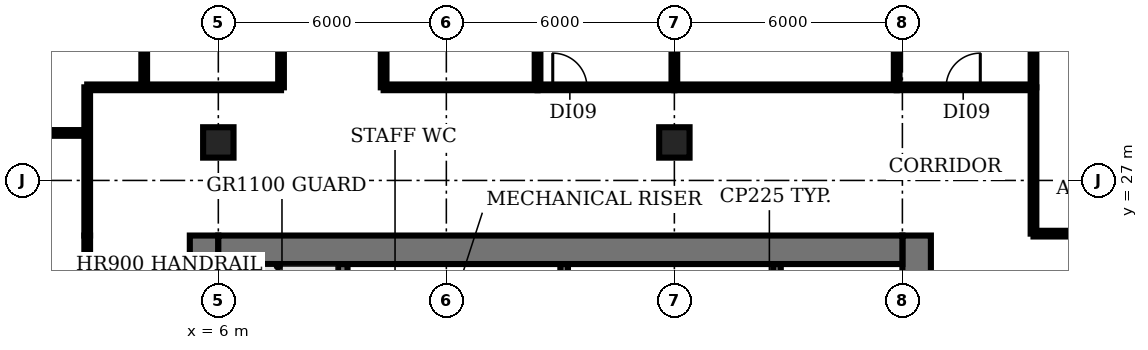
"""IFC4 building model, lengths in metres.
Left out: names, types, materials, properties, quantities, classifications, styles, units other than length and angle.
Written with IfcOpenShell. Run it as: python <this file> out.ifc"""

import sys

from ifc_helpers import new_model, si_unit, direction, frame, frame_2d, origin, origin_2d, place, context, subcontext, project, spatial, rectangle, extrude, element, fill, save


model = new_model("IFC4")
c1 = context("Model", 3, precision=1e-05, world=origin(), true_north=direction((0.0, 1.0)))
c2 = subcontext(c1, "Body", "Model", "MODEL_VIEW")
j1 = project(units=[si_unit("LENGTHUNIT", "METRE"), si_unit("PLANEANGLEUNIT", "RADIAN")], contexts=[c1])
p1 = place(None, origin())
s1 = spatial("IfcSite", under=j1, at=p1, CompositionType="ELEMENT")
p2 = place(p1, origin())
s2 = spatial("IfcBuilding", under=s1, at=p2, CompositionType="ELEMENT")
p3 = place(p2, frame((0.0, 0.0, 104.6)))
s3 = spatial("IfcBuildingStorey", under=s2, at=p3, CompositionType="ELEMENT", Elevation=104.6)
for number, where, z_axis, x_axis in (
    (1, (6.0, 28.0, 0.0), (0.0, 0.0, 1.0), (1.0, 0.0, 0.0)),
    (2, (18.0, 28.0, 0.0), (0.0, 0.0, 1.0), (1.0, 0.0, 0.0)),
):
    element("IfcColumn", number, at=place(p3, frame(where, z_axis=z_axis, x_axis=x_axis)), inside=s3, PredefinedType="COLUMN", context=c2, shape_type="SweptSolid", body=[
        extrude(rectangle(XDim=0.8, YDim=0.8, at=origin_2d()), origin(), (0.0, 0.0, 1.0), 3.85),
    ])
p4 = place(p3, frame((9.275, 18.375, 0.0), z_axis=(0.0, 0.0, 1.0), x_axis=(0.0, 1.0, 0.0)))
e3 = element("IfcWall", 3, at=p4, inside=s3, PredefinedType="SHEAR", context=c2, shape_type="SweptSolid", body=[
    extrude(rectangle(XDim=6.425, YDim=0.25, at=frame_2d((3.212, 0.0))), origin(), (0.0, 0.0, 1.0), 3.85),
])
for number, where, z_axis, x_axis in (
    (4, (15.1, 22.9, 0.0), (0.0, 0.0, 1.0), (0.0, 1.0, 0.0)),
    (5, (20.7, 22.9, 0.0), (0.0, 0.0, 1.0), (0.0, 1.0, 0.0)),
):
    element("IfcWall", number, at=place(p3, frame(where, z_axis=z_axis, x_axis=x_axis)), inside=s3, PredefinedType="SHEAR", context=c2, shape_type="SweptSolid", body=[
        extrude(rectangle(XDim=1.9, YDim=0.2, at=frame_2d((0.95, 0.0))), origin(), (0.0, 0.0, 1.0), 3.85),
    ])
p5 = place(p3, frame((5.625, 4.47, 0.0), z_axis=(0.0, 0.0, 1.0), x_axis=(0.0, 1.0, 0.0)))
e6 = element("IfcWall", 6, at=p5, inside=s3, PredefinedType="SHEAR", context=c2, shape_type="SweptSolid", body=[
    extrude(rectangle(XDim=21.08, YDim=0.75, at=frame_2d((10.54, 0.0))), origin(), (0.0, 0.0, 1.0), 3.85),
])
p6 = place(p5, frame((1.18, 0.0, 0.0)))
e7 = element("IfcOpeningElement", 7, at=p6, cuts=e6, PredefinedType="OPENING", context=c2, shape_type="SweptSolid", body=[
    extrude(rectangle(XDim=1.5, YDim=2.1, at=frame_2d((0.75, 1.05))), frame((0.0, 0.385, 0.0), z_axis=(0.0, -1.0, 0.0), x_axis=(1.0, 0.0, 0.0)), (0.0, 0.0, 1.0), 0.77),
])
p7 = place(p5, frame((7.63, 0.0, 0.0)))
e8 = element("IfcOpeningElement", 8, at=p7, cuts=e6, PredefinedType="OPENING", context=c2, shape_type="SweptSolid", body=[
    extrude(rectangle(XDim=1.2, YDim=2.1, at=frame_2d((0.6, 1.05))), frame((0.0, 0.385, 0.0), z_axis=(0.0, -1.0, 0.0), x_axis=(1.0, 0.0, 0.0)), (0.0, 0.0, 1.0), 0.77),
])
p8 = place(p5, frame((14.18, 0.0, 0.0)))
e9 = element("IfcOpeningElement", 9, at=p8, cuts=e6, PredefinedType="OPENING", context=c2, shape_type="SweptSolid", body=[
    extrude(rectangle(XDim=1.2, YDim=2.1, at=frame_2d((0.6, 1.05))), frame((0.0, 0.385, 0.0), z_axis=(0.0, -1.0, 0.0), x_axis=(1.0, 0.0, 0.0)), (0.0, 0.0, 1.0), 0.77),
])
p9 = place(p3, frame((24.375, 25.55, 0.0), z_axis=(0.0, 0.0, 1.0), x_axis=(0.0, -1.0, 0.0)))
e10 = element("IfcWall", 10, at=p9, inside=s3, PredefinedType="SHEAR", context=c2, shape_type="SweptSolid", body=[
    extrude(rectangle(XDim=21.13, YDim=0.75, at=frame_2d((10.565, 0.0))), origin(), (0.0, 0.0, 1.0), 3.85),
])
p10 = place(p9, frame((18.4, 0.0, 0.0)))
e11 = element("IfcOpeningElement", 11, at=p10, cuts=e10, PredefinedType="OPENING", context=c2, shape_type="SweptSolid", body=[
    extrude(rectangle(XDim=1.5, YDim=2.1, at=frame_2d((0.75, 1.05))), frame((0.0, 0.385, 0.0), z_axis=(0.0, -1.0, 0.0), x_axis=(1.0, 0.0, 0.0)), (0.0, 0.0, 1.0), 0.77),
])
p11 = place(p9, frame((12.3, 0.0, 0.0)))
e12 = element("IfcOpeningElement", 12, at=p11, cuts=e10, PredefinedType="OPENING", context=c2, shape_type="SweptSolid", body=[
    extrude(rectangle(XDim=0.9, YDim=2.1, at=frame_2d((0.45, 1.05))), frame((0.0, 0.385, 0.0), z_axis=(0.0, -1.0, 0.0), x_axis=(1.0, 0.0, 0.0)), (0.0, 0.0, 1.0), 0.77),
])
p12 = place(p9, frame((6.3, 0.0, 0.0)))
e13 = element("IfcOpeningElement", 13, at=p12, cuts=e10, PredefinedType="OPENING", context=c2, shape_type="SweptSolid", body=[
    extrude(rectangle(XDim=2.0, YDim=2.1, at=frame_2d((1.0, 1.05))), frame((0.0, 0.385, 0.0), z_axis=(0.0, -1.0, 0.0), x_axis=(1.0, 0.0, 0.0)), (0.0, 0.0, 1.0), 0.77),
])
p13 = place(p3, frame((6.0, 25.175, 0.0), z_axis=(0.0, 0.0, 1.0), x_axis=(1.0, 0.0, 0.0)))
e14 = element("IfcWall", 14, at=p13, inside=s3, PredefinedType="SHEAR", context=c2, shape_type="SweptSolid", body=[
    extrude(rectangle(XDim=18.0, YDim=0.75, at=frame_2d((9.0, 0.0))), origin(), (0.0, 0.0, 1.0), 3.85),
])
p14 = place(p3, frame((-0.98, 28.25, 0.0), z_axis=(0.0, 0.0, 1.0), x_axis=(1.0, 0.0, 0.0)))
e15 = element("IfcWall", 15, at=p14, inside=s3, PredefinedType="PARTITIONING", context=c2, shape_type="SweptSolid", body=[
    extrude(rectangle(XDim=3.53, YDim=0.15, at=frame_2d((1.765, 0.0))), origin(), (0.0, 0.0, 1.0), 2.83),
])
p15 = place(p3, frame((2.55, 6.113, 0.0), z_axis=(0.0, 0.0, 1.0), x_axis=(0.0, 1.0, 0.0)))
e16 = element("IfcWall", 16, at=p15, inside=s3, PredefinedType="PARTITIONING", context=c2, shape_type="SweptSolid", body=[
    extrude(rectangle(XDim=19.437, YDim=0.15, at=frame_2d((9.718, 0.0))), origin(), (0.0, 0.0, 1.0), 2.83),
])
p16 = place(p15, frame((7.537, 0.0, 0.0)))
e17 = element("IfcOpeningElement", 17, at=p16, cuts=e16, PredefinedType="OPENING", context=c2, shape_type="SweptSolid", body=[
    extrude(rectangle(XDim=1.2, YDim=2.1, at=frame_2d((0.6, 1.05))), frame((0.0, 0.085, 0.0), z_axis=(0.0, -1.0, 0.0), x_axis=(1.0, 0.0, 0.0)), (0.0, 0.0, 1.0), 0.17),
])
p17 = place(p3, frame((2.55, 25.55, 0.0), z_axis=(0.0, 0.0, 1.0), x_axis=(0.0, 1.0, 0.0)))
e18 = element("IfcWall", 18, at=p17, inside=s3, PredefinedType="PARTITIONING", context=c2, shape_type="SweptSolid", body=[
    extrude(rectangle(XDim=3.9, YDim=0.15, at=frame_2d((1.95, 0.0))), origin(), (0.0, 0.0, 1.0), 2.83),
])
p18 = place(p3, frame((2.55, 29.45, 0.0), z_axis=(0.0, 0.0, 1.0), x_axis=(1.0, 0.0, 0.0)))
e19 = element("IfcWall", 19, at=p18, inside=s3, PredefinedType="PARTITIONING", context=c2, shape_type="SweptSolid", body=[
    extrude(rectangle(XDim=5.1, YDim=0.15, at=frame_2d((2.55, 0.0))), origin(), (0.0, 0.0, 1.0), 2.83),
])
p19 = place(p3, frame((4.05, 29.45, 0.0), z_axis=(0.0, 0.0, 1.0), x_axis=(0.0, 1.0, 0.0)))
e20 = element("IfcWall", 20, at=p19, inside=s3, PredefinedType="PARTITIONING", context=c2, shape_type="SweptSolid", body=[
    extrude(rectangle(XDim=4.8, YDim=0.15, at=frame_2d((2.4, 0.0))), origin(), (0.0, 0.0, 1.0), 2.83),
])
p20 = place(p3, frame((7.65, 29.45, 0.0), z_axis=(0.0, 0.0, 1.0), x_axis=(0.0, 1.0, 0.0)))
e21 = element("IfcWall", 21, at=p20, inside=s3, PredefinedType="PARTITIONING", context=c2, shape_type="SweptSolid", body=[
    extrude(rectangle(XDim=4.8, YDim=0.15, at=frame_2d((2.4, 0.0))), origin(), (0.0, 0.0, 1.0), 2.83),
])
p21 = place(p20, frame((1.9, 0.0, 0.0)))
e22 = element("IfcOpeningElement", 22, at=p21, cuts=e21, PredefinedType="OPENING", context=c2, shape_type="SweptSolid", body=[
    extrude(rectangle(XDim=0.9, YDim=2.1, at=frame_2d((0.45, 1.05))), frame((0.0, 0.085, 0.0), z_axis=(0.0, -1.0, 0.0), x_axis=(1.0, 0.0, 0.0)), (0.0, 0.0, 1.0), 0.17),
])
p22 = place(p3, frame((10.35, 29.45, 0.0), z_axis=(0.0, 0.0, 1.0), x_axis=(0.0, 1.0, 0.0)))
e23 = element("IfcWall", 23, at=p22, inside=s3, PredefinedType="PARTITIONING", context=c2, shape_type="SweptSolid", body=[
    extrude(rectangle(XDim=4.8, YDim=0.15, at=frame_2d((2.4, 0.0))), origin(), (0.0, 0.0, 1.0), 2.83),
])
p23 = place(p3, frame((10.35, 29.45, 0.0), z_axis=(0.0, 0.0, 1.0), x_axis=(1.0, 0.0, 0.0)))
e24 = element("IfcWall", 24, at=p23, inside=s3, PredefinedType="PARTITIONING", context=c2, shape_type="SweptSolid", body=[
    extrude(rectangle(XDim=4.05, YDim=0.15, at=frame_2d((2.025, 0.0))), origin(), (0.0, 0.0, 1.0), 2.83),
])
p24 = place(p3, frame((14.4, 29.45, 0.0), z_axis=(0.0, 0.0, 1.0), x_axis=(0.0, 1.0, 0.0)))
e25 = element("IfcWall", 25, at=p24, inside=s3, PredefinedType="PARTITIONING", context=c2, shape_type="SweptSolid", body=[
    extrude(rectangle(XDim=4.8, YDim=0.15, at=frame_2d((2.4, 0.0))), origin(), (0.0, 0.0, 1.0), 2.83),
])
p25 = place(p3, frame((14.4, 29.45, 0.0), z_axis=(0.0, 0.0, 1.0), x_axis=(1.0, 0.0, 0.0)))
e26 = element("IfcWall", 26, at=p25, inside=s3, PredefinedType="PARTITIONING", context=c2, shape_type="SweptSolid", body=[
    extrude(rectangle(XDim=3.6, YDim=0.15, at=frame_2d((1.8, 0.0))), origin(), (0.0, 0.0, 1.0), 2.83),
])
p26 = place(p25, frame((0.4, 0.0, 0.0)))
e27 = element("IfcOpeningElement", 27, at=p26, cuts=e26, PredefinedType="OPENING", context=c2, shape_type="SweptSolid", body=[
    extrude(rectangle(XDim=0.9, YDim=2.1, at=frame_2d((0.45, 1.05))), frame((0.0, 0.085, 0.0), z_axis=(0.0, -1.0, 0.0), x_axis=(1.0, 0.0, 0.0)), (0.0, 0.0, 1.0), 0.17),
])
p27 = place(p3, frame((18.0, 29.45, 0.0), z_axis=(0.0, 0.0, 1.0), x_axis=(0.0, 1.0, 0.0)))
e28 = element("IfcWall", 28, at=p27, inside=s3, PredefinedType="PARTITIONING", context=c2, shape_type="SweptSolid", body=[
    extrude(rectangle(XDim=4.8, YDim=0.15, at=frame_2d((2.4, 0.0))), origin(), (0.0, 0.0, 1.0), 2.83),
])
p28 = place(p3, frame((18.0, 29.45, 0.0), z_axis=(0.0, 0.0, 1.0), x_axis=(1.0, 0.0, 0.0)))
e29 = element("IfcWall", 29, at=p28, inside=s3, PredefinedType="PARTITIONING", context=c2, shape_type="SweptSolid", body=[
    extrude(rectangle(XDim=5.85, YDim=0.15, at=frame_2d((2.925, 0.0))), origin(), (0.0, 0.0, 1.0), 2.83),
])
p29 = place(p3, frame((23.85, 29.45, 0.0), z_axis=(0.0, 0.0, 1.0), x_axis=(0.0, 1.0, 0.0)))
e30 = element("IfcWall", 30, at=p29, inside=s3, PredefinedType="PARTITIONING", context=c2, shape_type="SweptSolid", body=[
    extrude(rectangle(XDim=4.8, YDim=0.15, at=frame_2d((2.4, 0.0))), origin(), (0.0, 0.0, 1.0), 2.83),
])
p30 = place(p3, frame((23.85, 29.45, 0.0), z_axis=(0.0, 0.0, 1.0), x_axis=(1.0, 0.0, 0.0)))
e31 = element("IfcWall", 31, at=p30, inside=s3, PredefinedType="PARTITIONING", context=c2, shape_type="SweptSolid", body=[
    extrude(rectangle(XDim=3.6, YDim=0.15, at=frame_2d((1.8, 0.0))), origin(), (0.0, 0.0, 1.0), 2.83),
])
p31 = place(p30, frame((1.3, 0.0, 0.0)))
e32 = element("IfcOpeningElement", 32, at=p31, cuts=e31, PredefinedType="OPENING", context=c2, shape_type="SweptSolid", body=[
    extrude(rectangle(XDim=0.9, YDim=2.1, at=frame_2d((0.45, 1.05))), frame((0.0, 0.085, 0.0), z_axis=(0.0, -1.0, 0.0), x_axis=(1.0, 0.0, 0.0)), (0.0, 0.0, 1.0), 0.17),
])
p32 = place(p3, frame((27.45, 25.6, 0.0), z_axis=(0.0, 0.0, 1.0), x_axis=(0.0, 1.0, 0.0)))
e33 = element("IfcWall", 33, at=p32, inside=s3, PredefinedType="PARTITIONING", context=c2, shape_type="SweptSolid", body=[
    extrude(rectangle(XDim=3.85, YDim=0.15, at=frame_2d((1.925, 0.0))), origin(), (0.0, 0.0, 1.0), 2.83),
])
p33 = place(p3, frame((27.45, 25.6, 0.0), z_axis=(0.0, 0.0, 1.0), x_axis=(1.0, 0.0, 0.0)))
e34 = element("IfcWall", 34, at=p33, inside=s3, PredefinedType="PARTITIONING", context=c2, shape_type="SweptSolid", body=[
    extrude(rectangle(XDim=8.55, YDim=0.15, at=frame_2d((4.275, 0.0))), origin(), (0.0, 0.0, 1.0), 2.83),
])
p34 = place(p33, frame((4.15, 0.0, 0.0)))
e35 = element("IfcOpeningElement", 35, at=p34, cuts=e34, PredefinedType="OPENING", context=c2, shape_type="SweptSolid", body=[
    extrude(rectangle(XDim=0.9, YDim=2.1, at=frame_2d((0.45, 1.05))), frame((0.0, 0.085, 0.0), z_axis=(0.0, -1.0, 0.0), x_axis=(1.0, 0.0, 0.0)), (0.0, 0.0, 1.0), 0.17),
])
p35 = place(p3, frame((27.45, 29.45, 0.0), z_axis=(0.0, 0.0, 1.0), x_axis=(0.0, 1.0, 0.0)))
e36 = element("IfcWall", 36, at=p35, inside=s3, PredefinedType="PARTITIONING", context=c2, shape_type="SweptSolid", body=[
    extrude(rectangle(XDim=2.64, YDim=0.15, at=frame_2d((1.32, 0.0))), origin(), (0.0, 0.0, 1.0), 2.83),
])
p36 = place(p26, origin())
e37 = element("IfcDoor", 37, at=p36, inside=s3, OperationType="SINGLE_SWING_LEFT", PredefinedType="DOOR", context=c2, shape_type="SweptSolid", body=[
    extrude(rectangle(XDim=0.9, YDim=2.1, at=frame_2d((0.45, 1.05))), frame((0.0, 0.025, 0.0), z_axis=(0.0, -1.0, 0.0), x_axis=(1.0, 0.0, 0.0)), (0.0, 0.0, 1.0), 0.05),
])
fill(e27, e37)
p37 = place(p31, origin())
e38 = element("IfcDoor", 38, at=p37, inside=s3, OperationType="SINGLE_SWING_RIGHT", PredefinedType="DOOR", context=c2, shape_type="SweptSolid", body=[
    extrude(rectangle(XDim=0.9, YDim=2.1, at=frame_2d((0.45, 1.05))), frame((0.0, 0.025, 0.0), z_axis=(0.0, -1.0, 0.0), x_axis=(1.0, 0.0, 0.0)), (0.0, 0.0, 1.0), 0.05),
])
fill(e32, e38)
save(model, sys.argv[1])
